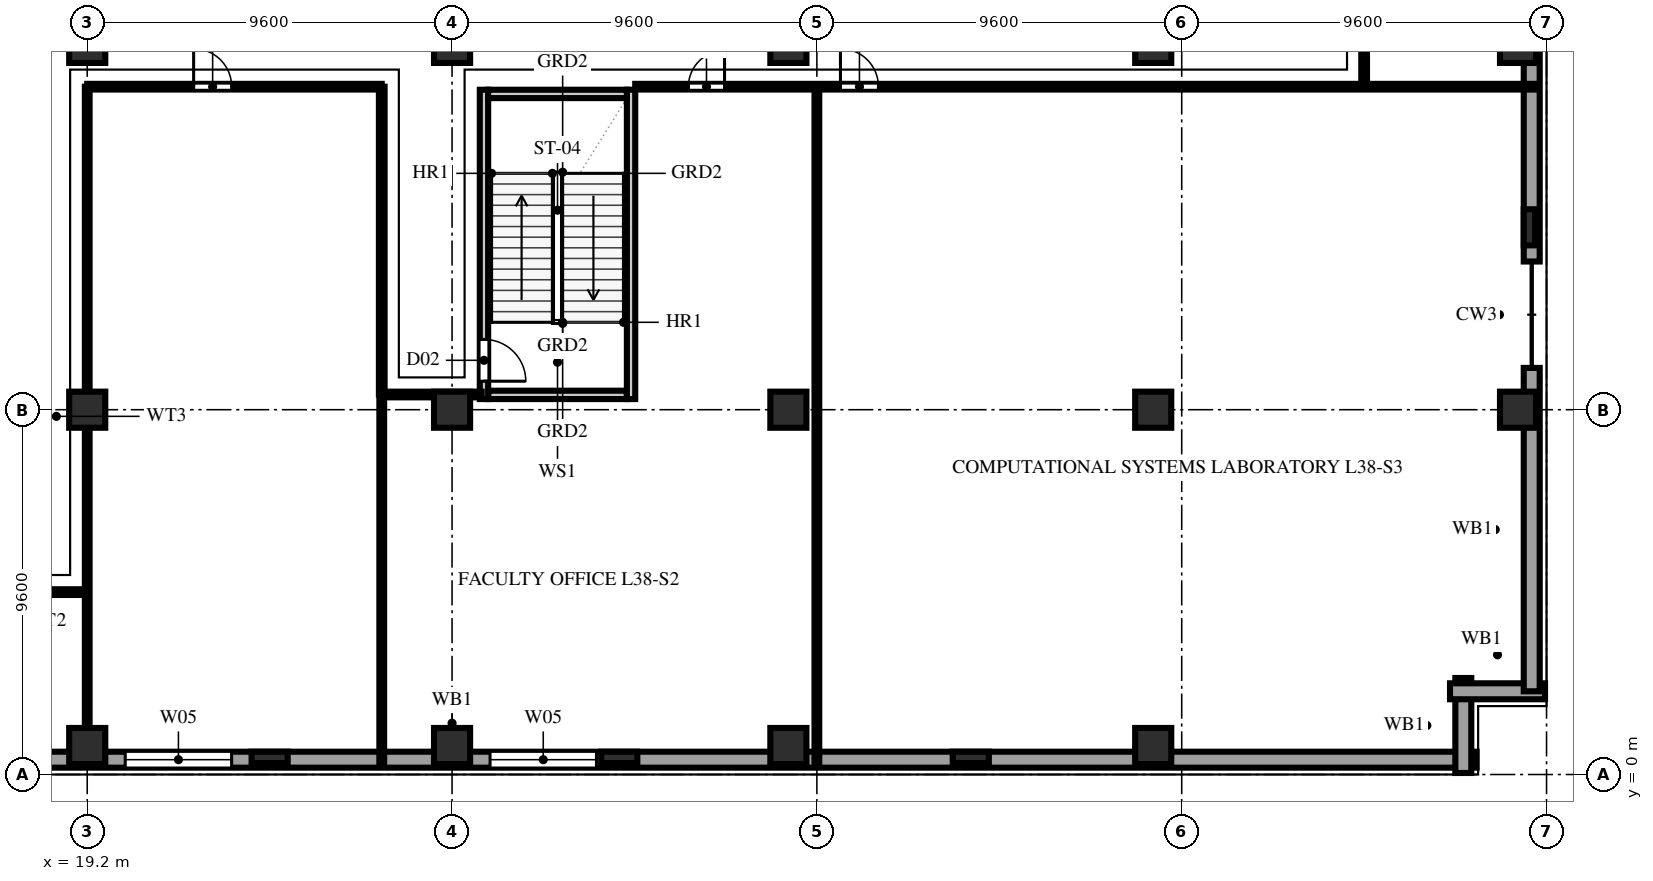
"""IFC4 building model, lengths in metres.
Left out: names, types, materials, properties, quantities, classifications, styles, units other than length and angle.
Written with IfcOpenShell. Run it as: python <this file> out.ifc"""

import sys

from ifc_helpers import new_model, si_unit, direction, frame, frame_2d, origin, origin_2d, place, context, subcontext, project, spatial, rectangle, extrude, element, fill, save


model = new_model("IFC4")
c1 = context("Model", 3, precision=1e-05, world=origin(), true_north=direction((0.0, 1.0)))
c2 = subcontext(c1, "Body", "Model", "MODEL_VIEW")
j1 = project(units=[si_unit("LENGTHUNIT", "METRE"), si_unit("PLANEANGLEUNIT", "RADIAN")], contexts=[c1])
p1 = place(None, origin())
s1 = spatial("IfcSite", under=j1, at=p1, CompositionType="ELEMENT")
p2 = place(p1, origin())
s2 = spatial("IfcBuilding", under=s1, at=p2, CompositionType="ELEMENT")
p3 = place(p2, frame((0.0, 0.0, 150.8)))
s3 = spatial("IfcBuildingStorey", under=s2, at=p3, CompositionType="ELEMENT", Elevation=150.8)
for number, where, z_axis, x_axis in (
    (1, (19.2, 0.75, 0.0), (0.0, 0.0, 1.0), (1.0, 0.0, 0.0)),
    (2, (19.2, 9.6, 0.0), (0.0, 0.0, 1.0), (1.0, 0.0, 0.0)),
    (3, (19.2, 19.2, 0.0), (0.0, 0.0, 1.0), (1.0, 0.0, 0.0)),
    (4, (28.8, 0.75, 0.0), (0.0, 0.0, 1.0), (1.0, 0.0, 0.0)),
    (5, (28.8, 9.6, 0.0), (0.0, 0.0, 1.0), (1.0, 0.0, 0.0)),
    (6, (28.8, 19.2, 0.0), (0.0, 0.0, 1.0), (1.0, 0.0, 0.0)),
    (7, (37.65, 0.75, 0.0), (0.0, 0.0, 1.0), (1.0, 0.0, 0.0)),
    (8, (37.65, 9.6, 0.0), (0.0, 0.0, 1.0), (1.0, 0.0, 0.0)),
    (9, (37.65, 19.2, 0.0), (0.0, 0.0, 1.0), (1.0, 0.0, 0.0)),
    (10, (47.25, 0.75, 0.0), (0.0, 0.0, 1.0), (1.0, 0.0, 0.0)),
    (11, (47.25, 9.6, 0.0), (0.0, 0.0, 1.0), (1.0, 0.0, 0.0)),
    (12, (47.25, 19.2, 0.0), (0.0, 0.0, 1.0), (1.0, 0.0, 0.0)),
    (13, (56.85, 9.6, 0.0), (0.0, 0.0, 1.0), (1.0, 0.0, 0.0)),
    (14, (56.85, 19.2, 0.0), (0.0, 0.0, 1.0), (1.0, 0.0, 0.0)),
):
    element("IfcColumn", number, at=place(p3, frame(where, z_axis=z_axis, x_axis=x_axis)), inside=s3, PredefinedType="COLUMN", context=c2, shape_type="SweptSolid", body=[
        extrude(rectangle(XDim=0.95, YDim=0.95, at=origin_2d()), origin(), (0.0, 0.0, 1.0), 5.2),
    ])
for number, where, z_axis, x_axis in (
    (15, (24.0, 0.45, 0.0), (0.0, 0.0, 1.0), (1.0, 0.0, 0.0)),
    (16, (33.2, 0.45, 0.0), (0.0, 0.0, 1.0), (1.0, 0.0, 0.0)),
    (17, (42.45, 0.45, 0.0), (0.0, 0.0, 1.0), (1.0, 0.0, 0.0)),
    (18, (57.15, 14.4, 0.0), (0.0, 0.0, 1.0), (0.0, 1.0, 0.0)),
):
    element("IfcColumn", number, at=place(p3, frame(where, z_axis=z_axis, x_axis=x_axis)), inside=s3, PredefinedType="PILASTER", context=c2, shape_type="SweptSolid", body=[
        extrude(rectangle(XDim=0.95, YDim=0.3, at=origin_2d()), origin(), (0.0, 0.0, 1.0), 5.2),
    ])
p4 = place(p3, frame((1.84, 0.39, 0.0), z_axis=(0.0, 0.0, 1.0), x_axis=(1.0, 0.0, 0.0)))
e19 = element("IfcWall", 19, at=p4, inside=s3, PredefinedType="SOLIDWALL", context=c2, shape_type="SweptSolid", body=[
    extrude(rectangle(XDim=53.92, YDim=0.42, at=frame_2d((26.96, 0.0))), origin(), (0.0, 0.0, 1.0), 4.94),
])
p5 = place(p4, frame((3.96, 0.0, 0.75)))
e20 = element("IfcOpeningElement", 20, at=p5, cuts=e19, PredefinedType="OPENING", context=c2, shape_type="SweptSolid", body=[
    extrude(rectangle(XDim=2.8, YDim=2.3, at=frame_2d((1.4, 1.15))), frame((0.0, 0.222, 0.0), z_axis=(0.0, -1.0, 0.0), x_axis=(1.0, 0.0, 0.0)), (0.0, 0.0, 1.0), 0.444),
])
p6 = place(p4, frame((8.76, 0.0, 0.75)))
e21 = element("IfcOpeningElement", 21, at=p6, cuts=e19, PredefinedType="OPENING", context=c2, shape_type="SweptSolid", body=[
    extrude(rectangle(XDim=2.8, YDim=2.3, at=frame_2d((1.4, 1.15))), frame((0.0, 0.222, 0.0), z_axis=(0.0, -1.0, 0.0), x_axis=(1.0, 0.0, 0.0)), (0.0, 0.0, 1.0), 0.444),
])
p7 = place(p4, frame((18.36, 0.0, 0.75)))
e22 = element("IfcOpeningElement", 22, at=p7, cuts=e19, PredefinedType="OPENING", context=c2, shape_type="SweptSolid", body=[
    extrude(rectangle(XDim=2.8, YDim=2.3, at=frame_2d((1.4, 1.15))), frame((0.0, 0.222, 0.0), z_axis=(0.0, -1.0, 0.0), x_axis=(1.0, 0.0, 0.0)), (0.0, 0.0, 1.0), 0.444),
])
p8 = place(p4, frame((27.96, 0.0, 0.75)))
e23 = element("IfcOpeningElement", 23, at=p8, cuts=e19, PredefinedType="OPENING", context=c2, shape_type="SweptSolid", body=[
    extrude(rectangle(XDim=2.8, YDim=2.3, at=frame_2d((1.4, 1.15))), frame((0.0, 0.222, 0.0), z_axis=(0.0, -1.0, 0.0), x_axis=(1.0, 0.0, 0.0)), (0.0, 0.0, 1.0), 0.444),
])
for number, where, z_axis, x_axis in (
    (24, (55.41, 0.04, 0.0), (0.0, 0.0, 1.0), (0.0, 1.0, 0.0)),
    (25, (55.06, 2.19, 0.0), (0.0, 0.0, 1.0), (1.0, 0.0, 0.0)),
):
    element("IfcWall", number, at=place(p3, frame(where, z_axis=z_axis, x_axis=x_axis)), inside=s3, PredefinedType="SOLIDWALL", context=c2, shape_type="SweptSolid", body=[
        extrude(rectangle(XDim=2.5, YDim=0.42, at=frame_2d((1.25, 0.0))), origin(), (0.0, 0.0, 1.0), 4.94),
    ])
p9 = place(p3, frame((57.21, 2.19, 0.0), z_axis=(0.0, 0.0, 1.0), x_axis=(0.0, 1.0, 0.0)))
e26 = element("IfcWall", 26, at=p9, inside=s3, PredefinedType="SOLIDWALL", context=c2, shape_type="SweptSolid", body=[
    extrude(rectangle(XDim=8.51, YDim=0.42, at=frame_2d((4.255, 0.0))), origin(), (0.0, 0.0, 1.0), 4.94),
])
p10 = place(p3, frame((57.21, 13.5, 0.0), z_axis=(0.0, 0.0, 1.0), x_axis=(0.0, 1.0, 0.0)))
e27 = element("IfcWall", 27, at=p10, inside=s3, PredefinedType="SOLIDWALL", context=c2, shape_type="SweptSolid", body=[
    extrude(rectangle(XDim=6.8, YDim=0.42, at=frame_2d((3.4, 0.0))), origin(), (0.0, 0.0, 1.0), 4.94),
])
p11 = place(p3, frame((29.75, 9.99, 0.0), z_axis=(0.0, 0.0, 1.0), x_axis=(1.0, 0.0, 0.0)))
e28 = element("IfcWall", 28, at=p11, inside=s3, PredefinedType="SOLIDWALL", context=c2, shape_type="SweptSolid", body=[
    extrude(rectangle(XDim=3.65, YDim=0.22, at=frame_2d((1.825, 0.0))), origin(), (0.0, 0.0, 1.0), 4.94),
])
p12 = place(p3, frame((29.64, 9.88, 0.0), z_axis=(0.0, 0.0, 1.0), x_axis=(0.0, 1.0, 0.0)))
e29 = element("IfcWall", 29, at=p12, inside=s3, PredefinedType="SOLIDWALL", context=c2, shape_type="SweptSolid", body=[
    extrude(rectangle(XDim=8.14, YDim=0.22, at=frame_2d((4.07, 0.0))), origin(), (0.0, 0.0, 1.0), 4.94),
])
p13 = place(p12, frame((0.47, 0.0, 0.0)))
e30 = element("IfcOpeningElement", 30, at=p13, cuts=e29, PredefinedType="OPENING", context=c2, shape_type="SweptSolid", body=[
    extrude(rectangle(XDim=1.1, YDim=2.2, at=frame_2d((0.55, 1.1))), frame((0.0, 0.122, 0.0), z_axis=(0.0, -1.0, 0.0), x_axis=(1.0, 0.0, 0.0)), (0.0, 0.0, 1.0), 0.244),
])
p14 = place(p3, frame((33.51, 9.88, 0.0), z_axis=(0.0, 0.0, 1.0), x_axis=(0.0, 1.0, 0.0)))
e31 = element("IfcWall", 31, at=p14, inside=s3, PredefinedType="SOLIDWALL", context=c2, shape_type="SweptSolid", body=[
    extrude(rectangle(XDim=8.14, YDim=0.22, at=frame_2d((4.07, 0.0))), origin(), (0.0, 0.0, 1.0), 4.94),
])
p15 = place(p3, frame((29.75, 17.91, 0.0), z_axis=(0.0, 0.0, 1.0), x_axis=(1.0, 0.0, 0.0)))
e32 = element("IfcWall", 32, at=p15, inside=s3, PredefinedType="SOLIDWALL", context=c2, shape_type="SweptSolid", body=[
    extrude(rectangle(XDim=3.65, YDim=0.22, at=frame_2d((1.825, 0.0))), origin(), (0.0, 0.0, 1.0), 4.94),
])
p16 = place(p3, frame((17.05, 4.8, 0.0), z_axis=(0.0, 0.0, 1.0), x_axis=(1.0, 0.0, 0.0)))
e33 = element("IfcWall", 33, at=p16, inside=s3, PredefinedType="PARTITIONING", context=c2, shape_type="SweptSolid", body=[
    extrude(rectangle(XDim=2.15, YDim=0.15, at=frame_2d((1.075, 0.0))), origin(), (0.0, 0.0, 1.0), 4.94),
])
p17 = place(p3, frame((52.8, 18.1, 0.0), z_axis=(0.0, 0.0, 1.0), x_axis=(0.0, 1.0, 0.0)))
e34 = element("IfcWall", 34, at=p17, inside=s3, PredefinedType="PARTITIONING", context=c2, shape_type="SweptSolid", body=[
    extrude(rectangle(XDim=2.85, YDim=0.15, at=frame_2d((1.425, 0.0))), origin(), (0.0, 0.0, 1.0), 4.94),
])
p18 = place(p3, frame((19.2, 0.22, 0.0), z_axis=(0.0, 0.0, 1.0), x_axis=(0.0, 1.0, 0.0)))
e35 = element("IfcWall", 35, at=p18, inside=s3, PredefinedType="PARTITIONING", context=c2, shape_type="SweptSolid", body=[
    extrude(rectangle(XDim=0.53, YDim=0.125, at=frame_2d((0.265, 0.0))), origin(), (0.0, 0.0, 1.0), 4.94),
])
p19 = place(p3, frame((19.2, 0.75, 0.0), z_axis=(0.0, 0.0, 1.0), x_axis=(0.0, 1.0, 0.0)))
e36 = element("IfcWall", 36, at=p19, inside=s3, PredefinedType="PARTITIONING", context=c2, shape_type="SweptSolid", body=[
    extrude(rectangle(XDim=17.35, YDim=0.125, at=frame_2d((8.675, 0.0))), origin(), (0.0, 0.0, 1.0), 4.245),
])
p20 = place(p3, frame((19.2, 18.1, 0.0), z_axis=(0.0, 0.0, 1.0), x_axis=(1.0, 0.0, 0.0)))
e37 = element("IfcWall", 37, at=p20, inside=s3, PredefinedType="PARTITIONING", context=c2, shape_type="SweptSolid", body=[
    extrude(rectangle(XDim=7.75, YDim=0.15, at=frame_2d((3.875, 0.0))), origin(), (0.0, 0.0, 1.0), 4.94),
])
p21 = place(p20, frame((2.8, 0.0, 0.0)))
e38 = element("IfcOpeningElement", 38, at=p21, cuts=e37, PredefinedType="OPENING", context=c2, shape_type="SweptSolid", body=[
    extrude(rectangle(XDim=1.0, YDim=2.2, at=frame_2d((0.5, 1.1))), frame((0.0, 0.087, 0.0), z_axis=(0.0, -1.0, 0.0), x_axis=(1.0, 0.0, 0.0)), (0.0, 0.0, 1.0), 0.174),
])
p22 = place(p3, frame((26.95, 0.22, 0.0), z_axis=(0.0, 0.0, 1.0), x_axis=(0.0, 1.0, 0.0)))
e39 = element("IfcWall", 39, at=p22, inside=s3, PredefinedType="PARTITIONING", context=c2, shape_type="SweptSolid", body=[
    extrude(rectangle(XDim=9.78, YDim=0.125, at=frame_2d((4.89, 0.0))), origin(), (0.0, 0.0, 1.0), 4.94),
])
p23 = place(p3, frame((26.95, 10.0, 0.0), z_axis=(0.0, 0.0, 1.0), x_axis=(0.0, 1.0, 0.0)))
e40 = element("IfcWall", 40, at=p23, inside=s3, PredefinedType="PARTITIONING", context=c2, shape_type="SweptSolid", body=[
    extrude(rectangle(XDim=8.1, YDim=0.15, at=frame_2d((4.05, 0.0))), origin(), (0.0, 0.0, 1.0), 4.94),
])
p24 = place(p3, frame((26.95, 10.0, 0.0), z_axis=(0.0, 0.0, 1.0), x_axis=(1.0, 0.0, 0.0)))
e41 = element("IfcWall", 41, at=p24, inside=s3, PredefinedType="PARTITIONING", context=c2, shape_type="SweptSolid", body=[
    extrude(rectangle(XDim=2.63, YDim=0.15, at=frame_2d((1.315, 0.0))), origin(), (0.0, 0.0, 1.0), 4.94),
])
p25 = place(p3, frame((38.4, 0.22, 0.0), z_axis=(0.0, 0.0, 1.0), x_axis=(0.0, 1.0, 0.0)))
e42 = element("IfcWall", 42, at=p25, inside=s3, PredefinedType="PARTITIONING", context=c2, shape_type="SweptSolid", body=[
    extrude(rectangle(XDim=17.88, YDim=0.125, at=frame_2d((8.94, 0.0))), origin(), (0.0, 0.0, 1.0), 4.94),
])
p26 = place(p3, frame((33.62, 18.1, 0.0), z_axis=(0.0, 0.0, 1.0), x_axis=(1.0, 0.0, 0.0)))
e43 = element("IfcWall", 43, at=p26, inside=s3, PredefinedType="PARTITIONING", context=c2, shape_type="SweptSolid", body=[
    extrude(rectangle(XDim=23.76, YDim=0.15, at=frame_2d((11.88, 0.0))), origin(), (0.0, 0.0, 1.0), 4.94),
])
p27 = place(p26, frame((1.4, 0.0, 0.0)))
e44 = element("IfcOpeningElement", 44, at=p27, cuts=e43, PredefinedType="OPENING", context=c2, shape_type="SweptSolid", body=[
    extrude(rectangle(XDim=0.95, YDim=2.15, at=frame_2d((0.475, 1.075))), frame((0.0, 0.087, 0.0), z_axis=(0.0, -1.0, 0.0), x_axis=(1.0, 0.0, 0.0)), (0.0, 0.0, 1.0), 0.174),
])
p28 = place(p26, frame((5.4, 0.0, 0.0)))
e45 = element("IfcOpeningElement", 45, at=p28, cuts=e43, PredefinedType="OPENING", context=c2, shape_type="SweptSolid", body=[
    extrude(rectangle(XDim=1.0, YDim=2.2, at=frame_2d((0.5, 1.1))), frame((0.0, 0.087, 0.0), z_axis=(0.0, -1.0, 0.0), x_axis=(1.0, 0.0, 0.0)), (0.0, 0.0, 1.0), 0.174),
])
p29 = place(p7, origin())
e46 = element("IfcWindow", 46, at=p29, inside=s3, PartitioningType="TRIPLE_PANEL_VERTICAL", PredefinedType="WINDOW", context=c2, shape_type="SweptSolid", body=[
    extrude(rectangle(XDim=2.8, YDim=2.3, at=frame_2d((1.4, 1.15))), frame((0.0, 0.11, 0.0), z_axis=(0.0, -1.0, 0.0), x_axis=(1.0, 0.0, 0.0)), (0.0, 0.0, 1.0), 0.06),
])
fill(e22, e46)
p30 = place(p8, origin())
e47 = element("IfcWindow", 47, at=p30, inside=s3, PartitioningType="TRIPLE_PANEL_VERTICAL", PredefinedType="WINDOW", context=c2, shape_type="SweptSolid", body=[
    extrude(rectangle(XDim=2.8, YDim=2.3, at=frame_2d((1.4, 1.15))), frame((0.0, 0.11, 0.0), z_axis=(0.0, -1.0, 0.0), x_axis=(1.0, 0.0, 0.0)), (0.0, 0.0, 1.0), 0.06),
])
fill(e23, e47)
p31 = place(p13, frame((1.1, 0.0, 0.0), z_axis=(0.0, 0.0, 1.0), x_axis=(-1.0, 0.0, 0.0)))
e48 = element("IfcDoor", 48, at=p31, inside=s3, OperationType="SINGLE_SWING_RIGHT", PredefinedType="DOOR", context=c2, shape_type="SweptSolid", body=[
    extrude(rectangle(XDim=1.1, YDim=2.2, at=frame_2d((0.55, 1.1))), frame((0.0, 0.025, 0.0), z_axis=(0.0, -1.0, 0.0), x_axis=(1.0, 0.0, 0.0)), (0.0, 0.0, 1.0), 0.05),
])
fill(e30, e48)
p32 = place(p21, origin())
e49 = element("IfcDoor", 49, at=p32, inside=s3, OperationType="SINGLE_SWING_LEFT", PredefinedType="DOOR", context=c2, shape_type="SweptSolid", body=[
    extrude(rectangle(XDim=1.0, YDim=2.2, at=frame_2d((0.5, 1.1))), frame((0.0, 0.025, 0.0), z_axis=(0.0, -1.0, 0.0), x_axis=(1.0, 0.0, 0.0)), (0.0, 0.0, 1.0), 0.05),
])
fill(e38, e49)
p33 = place(p27, origin())
e50 = element("IfcDoor", 50, at=p33, inside=s3, OperationType="SINGLE_SWING_RIGHT", PredefinedType="DOOR", context=c2, shape_type="SweptSolid", body=[
    extrude(rectangle(XDim=0.95, YDim=2.15, at=frame_2d((0.475, 1.075))), frame((0.0, 0.025, 0.0), z_axis=(0.0, -1.0, 0.0), x_axis=(1.0, 0.0, 0.0)), (0.0, 0.0, 1.0), 0.05),
])
fill(e44, e50)
p34 = place(p28, origin())
e51 = element("IfcDoor", 51, at=p34, inside=s3, OperationType="SINGLE_SWING_LEFT", PredefinedType="DOOR", context=c2, shape_type="SweptSolid", body=[
    extrude(rectangle(XDim=1.0, YDim=2.2, at=frame_2d((0.5, 1.1))), frame((0.0, 0.025, 0.0), z_axis=(0.0, -1.0, 0.0), x_axis=(1.0, 0.0, 0.0)), (0.0, 0.0, 1.0), 0.05),
])
fill(e45, e51)
save(model, sys.argv[1])
